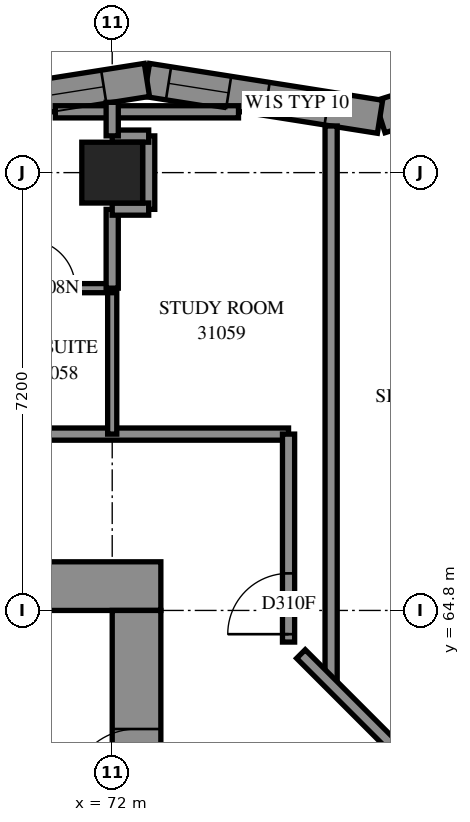
"""IFC4 building model, lengths in metres.
Left out: names, types, materials, properties, quantities, classifications, styles, units other than length and angle.
Written with IfcOpenShell. Run it as: python <this file> out.ifc"""

import sys

from ifc_helpers import new_model, si_unit, direction, frame, frame_2d, origin, origin_2d, place, context, subcontext, project, spatial, polyline, rectangle, outline, extrude, element, fill, save


model = new_model("IFC4")
c1 = context("Model", 3, precision=1e-05, world=origin(), true_north=direction((0.0, 1.0)))
c2 = subcontext(c1, "Body", "Model", "MODEL_VIEW")
j1 = project(units=[si_unit("LENGTHUNIT", "METRE"), si_unit("PLANEANGLEUNIT", "RADIAN")], contexts=[c1])
p1 = place(None, origin())
s1 = spatial("IfcSite", under=j1, at=p1, CompositionType="ELEMENT")
p2 = place(p1, origin())
s2 = spatial("IfcBuilding", under=s1, at=p2, CompositionType="ELEMENT")
p3 = place(p2, frame((0.0, 0.0, 115.2)))
s3 = spatial("IfcBuildingStorey", under=s2, at=p3, CompositionType="ELEMENT", Elevation=115.2)
p4 = place(p3, frame((72.0, 72.0, 0.0), z_axis=(0.0, 0.0, 1.0), x_axis=(1.0, 0.0, 0.0)))
e1 = element("IfcColumn", 1, at=p4, inside=s3, PredefinedType="COLUMN", context=c2, shape_type="SweptSolid", body=[
    extrude(rectangle(XDim=1.0, YDim=1.0, at=origin_2d()), origin(), (0.0, 0.0, 1.0), 3.1),
])
p5 = place(p3, frame((56.8, 65.2, -0.3), z_axis=(0.0, 0.0, 1.0), x_axis=(1.0, 0.0, 0.0)))
e2 = element("IfcWall", 2, at=p5, inside=s3, PredefinedType="SHEAR", context=c2, shape_type="SweptSolid", body=[
    extrude(rectangle(XDim=16.0, YDim=0.8, at=frame_2d((8.0, 0.0))), origin(), (0.0, 0.0, 1.0), 2.7),
])
p6 = place(p5, frame((10.8, 0.0, 0.3)))
e3 = element("IfcOpeningElement", 3, at=p6, cuts=e2, PredefinedType="OPENING", context=c2, shape_type="SweptSolid", body=[
    extrude(rectangle(XDim=0.8, YDim=2.1, at=frame_2d((0.4, 1.05))), frame((0.0, 0.41, 0.0), z_axis=(0.0, -1.0, 0.0), x_axis=(1.0, 0.0, 0.0)), (0.0, 0.0, 1.0), 0.82),
])
p7 = place(p3, frame((72.4, 50.4, -0.3), z_axis=(0.0, 0.0, 1.0), x_axis=(0.0, 1.0, 0.0)))
e4 = element("IfcWall", 4, at=p7, inside=s3, PredefinedType="SHEAR", context=c2, shape_type="SweptSolid", body=[
    extrude(rectangle(XDim=14.4, YDim=0.8, at=frame_2d((7.2, 0.0))), origin(), (0.0, 0.0, 1.0), 2.7),
])
p8 = place(p7, frame((4.55, 0.0, 0.3)))
e5 = element("IfcOpeningElement", 5, at=p8, cuts=e4, PredefinedType="OPENING", context=c2, shape_type="SweptSolid", body=[
    extrude(rectangle(XDim=1.1, YDim=2.1, at=frame_2d((0.55, 1.05))), frame((0.0, 0.41, 0.0), z_axis=(0.0, -1.0, 0.0), x_axis=(1.0, 0.0, 0.0)), (0.0, 0.0, 1.0), 0.82),
])
p9 = place(p7, frame((11.35, 0.0, 0.3)))
e6 = element("IfcOpeningElement", 6, at=p9, cuts=e4, PredefinedType="OPENING", context=c2, shape_type="SweptSolid", body=[
    extrude(rectangle(XDim=1.1, YDim=2.1, at=frame_2d((0.55, 1.05))), frame((0.0, 0.41, 0.0), z_axis=(0.0, -1.0, 0.0), x_axis=(1.0, 0.0, 0.0)), (0.0, 0.0, 1.0), 0.82),
])
p10 = place(p3, frame((80.05, 74.069, 0.0), z_axis=(0.0, 0.0, 1.0), x_axis=(-0.9536522041, -0.3009110726, 0.0)))
e7 = element("IfcWall", 7, at=p10, inside=s3, PredefinedType="SOLIDWALL", context=c2, shape_type="SweptSolid", body=[
    extrude(outline(polyline([(-0.239, -0.275), (3.759, -0.275), (3.889, 0.275), (0.239, 0.275), (-0.239, -0.275)])), origin(), (0.0, 0.0, 1.0), 3.1),
])
p11 = place(p10, frame((1.308, 0.0, 0.5)))
e8 = element("IfcOpeningElement", 8, at=p11, cuts=e7, PredefinedType="OPENING", context=c2, shape_type="SweptSolid", body=[
    extrude(rectangle(XDim=1.2, YDim=2.45, at=frame_2d((0.6, 1.225))), frame((0.0, 0.285, 0.0), z_axis=(0.0, -1.0, 0.0), x_axis=(1.0, 0.0, 0.0)), (0.0, 0.0, 1.0), 0.57),
])
p12 = place(p3, frame((76.404, 72.918, 0.0), z_axis=(0.0, 0.0, 1.0), x_axis=(-0.9877221932, 0.1562205785, 0.0)))
e9 = element("IfcWall", 9, at=p12, inside=s3, PredefinedType="SOLIDWALL", context=c2, shape_type="SweptSolid", body=[
    extrude(outline(polyline([(0.065, -0.275), (3.925, -0.275), (3.838, 0.275), (-0.065, 0.275), (0.065, -0.275)])), origin(), (0.0, 0.0, 1.0), 3.1),
])
p13 = place(p12, frame((0.88, 0.0, 0.45)))
e10 = element("IfcOpeningElement", 10, at=p13, cuts=e9, PredefinedType="OPENING", context=c2, shape_type="SweptSolid", body=[
    extrude(rectangle(XDim=1.0, YDim=2.5, at=frame_2d((0.5, 1.25))), frame((0.0, 0.285, 0.0), z_axis=(0.0, -1.0, 0.0), x_axis=(1.0, 0.0, 0.0)), (0.0, 0.0, 1.0), 0.57),
])
p14 = place(p12, frame((2.521, 0.0, 0.45)))
e11 = element("IfcOpeningElement", 11, at=p14, cuts=e9, PredefinedType="OPENING", context=c2, shape_type="SweptSolid", body=[
    extrude(rectangle(XDim=1.0, YDim=2.5, at=frame_2d((0.5, 1.25))), frame((0.0, 0.285, 0.0), z_axis=(0.0, -1.0, 0.0), x_axis=(1.0, 0.0, 0.0)), (0.0, 0.0, 1.0), 0.57),
])
p15 = place(p3, frame((72.571, 73.525, 0.0), z_axis=(0.0, 0.0, 1.0), x_axis=(-0.9877213372, -0.1562259905, 0.0)))
e12 = element("IfcWall", 12, at=p15, inside=s3, PredefinedType="SOLIDWALL", context=c2, shape_type="SweptSolid", body=[
    extrude(outline(polyline([(-0.043, -0.275), (3.816, -0.275), (3.903, 0.275), (0.043, 0.275), (-0.043, -0.275)])), origin(), (0.0, 0.0, 1.0), 3.1),
])
p16 = place(p15, frame((0.719, 0.0, 0.5)))
e13 = element("IfcOpeningElement", 13, at=p16, cuts=e12, PredefinedType="OPENING", context=c2, shape_type="SweptSolid", body=[
    extrude(rectangle(XDim=1.3, YDim=2.45, at=frame_2d((0.65, 1.225))), frame((0.0, 0.285, 0.0), z_axis=(0.0, -1.0, 0.0), x_axis=(1.0, 0.0, 0.0)), (0.0, 0.0, 1.0), 0.57),
])
p17 = place(p15, frame((2.219, 0.0, 0.5)))
e14 = element("IfcOpeningElement", 14, at=p17, cuts=e12, PredefinedType="OPENING", context=c2, shape_type="SweptSolid", body=[
    extrude(rectangle(XDim=1.3, YDim=2.45, at=frame_2d((0.65, 1.225))), frame((0.0, 0.285, 0.0), z_axis=(0.0, -1.0, 0.0), x_axis=(1.0, 0.0, 0.0)), (0.0, 0.0, 1.0), 0.57),
])
p18 = place(p3, frame((54.7, 67.7, 0.0), z_axis=(0.0, 0.0, 1.0), x_axis=(1.0, 0.0, 0.0)))
e15 = element("IfcWall", 15, at=p18, inside=s3, PredefinedType="PARTITIONING", context=c2, shape_type="SweptSolid", body=[
    extrude(rectangle(XDim=20.2, YDim=0.2, at=frame_2d((10.1, 0.0))), origin(), (0.0, 0.0, 1.0), 3.1),
])
p19 = place(p18, frame((5.2, 0.0, 0.0)))
e16 = element("IfcOpeningElement", 16, at=p19, cuts=e15, PredefinedType="OPENING", context=c2, shape_type="SweptSolid", body=[
    extrude(rectangle(XDim=0.9, YDim=2.1, at=frame_2d((0.45, 1.05))), frame((0.0, 0.11, 0.0), z_axis=(0.0, -1.0, 0.0), x_axis=(1.0, 0.0, 0.0)), (0.0, 0.0, 1.0), 0.22),
])
p20 = place(p18, frame((8.838, 0.0, 0.0)))
e17 = element("IfcOpeningElement", 17, at=p20, cuts=e15, PredefinedType="OPENING", context=c2, shape_type="SweptSolid", body=[
    extrude(rectangle(XDim=1.0, YDim=2.1, at=frame_2d((0.5, 1.05))), frame((0.0, 0.11, 0.0), z_axis=(0.0, -1.0, 0.0), x_axis=(1.0, 0.0, 0.0)), (0.0, 0.0, 1.0), 0.22),
])
p21 = place(p18, frame((14.1, 0.0, 0.0)))
e18 = element("IfcOpeningElement", 18, at=p21, cuts=e15, PredefinedType="OPENING", context=c2, shape_type="SweptSolid", body=[
    extrude(rectangle(XDim=0.9, YDim=2.1, at=frame_2d((0.45, 1.05))), frame((0.0, 0.11, 0.0), z_axis=(0.0, -1.0, 0.0), x_axis=(1.0, 0.0, 0.0)), (0.0, 0.0, 1.0), 0.22),
])
p22 = place(p3, frame((75.6, 63.58, 0.0), z_axis=(0.0, 0.0, 1.0), x_axis=(0.0, 1.0, 0.0)))
e19 = element("IfcWall", 19, at=p22, inside=s3, PredefinedType="PARTITIONING", context=c2, shape_type="SweptSolid", body=[
    extrude(rectangle(XDim=9.187, YDim=0.2, at=frame_2d((4.593, 0.0))), origin(), (0.0, 0.0, 1.0), 3.1),
])
p23 = place(p3, frame((75.103, 64.083, 0.0), z_axis=(0.0, 0.0, 1.0), x_axis=(0.7071067812, -0.7071067812, 0.0)))
e20 = element("IfcWall", 20, at=p23, inside=s3, PredefinedType="PARTITIONING", context=c2, shape_type="SweptSolid", body=[
    extrude(rectangle(XDim=4.214, YDim=0.2, at=frame_2d((2.107, 0.0))), origin(), (0.0, 0.0, 1.0), 3.1),
])
p24 = place(p23, frame((2.979, 0.0, 0.0)))
e21 = element("IfcOpeningElement", 21, at=p24, cuts=e20, PredefinedType="OPENING", context=c2, shape_type="SweptSolid", body=[
    extrude(rectangle(XDim=1.0, YDim=2.1, at=frame_2d((0.5, 1.05))), frame((0.0, 0.11, 0.0), z_axis=(0.0, -1.0, 0.0), x_axis=(1.0, 0.0, 0.0)), (0.0, 0.0, 1.0), 0.22),
])
p25 = place(p3, frame((74.9, 64.28, 0.0), z_axis=(0.0, 0.0, 1.0), x_axis=(0.0, 1.0, 0.0)))
e22 = element("IfcWall", 22, at=p25, inside=s3, PredefinedType="PARTITIONING", context=c2, shape_type="SweptSolid", body=[
    extrude(rectangle(XDim=3.42, YDim=0.2, at=frame_2d((1.71, 0.0))), origin(), (0.0, 0.0, 1.0), 3.1),
])
p26 = place(p25, frame((0.13, 0.0, 0.0)))
e23 = element("IfcOpeningElement", 23, at=p26, cuts=e22, PredefinedType="OPENING", context=c2, shape_type="SweptSolid", body=[
    extrude(rectangle(XDim=1.0, YDim=2.1, at=frame_2d((0.5, 1.05))), frame((0.0, 0.11, 0.0), z_axis=(0.0, -1.0, 0.0), x_axis=(1.0, 0.0, 0.0)), (0.0, 0.0, 1.0), 0.22),
])
p27 = place(p3, frame((71.064, 73.0, 0.0), z_axis=(0.0, 0.0, 1.0), x_axis=(1.0, 0.0, 0.0)))
e24 = element("IfcWall", 24, at=p27, inside=s3, PredefinedType="PARTITIONING", context=c2, shape_type="SweptSolid", body=[
    extrude(rectangle(XDim=3.013, YDim=0.2, at=frame_2d((1.506, 0.0))), origin(), (0.0, 0.0, 1.0), 3.1),
])
p28 = place(p3, frame((72.0, 67.7, 0.0), z_axis=(0.0, 0.0, 1.0), x_axis=(0.0, 1.0, 0.0)))
e25 = element("IfcWall", 25, at=p28, inside=s3, PredefinedType="PARTITIONING", context=c2, shape_type="SweptSolid", body=[
    extrude(rectangle(XDim=2.4, YDim=0.15, at=frame_2d((1.2, 0.0))), origin(), (0.0, 0.0, 1.0), 3.1),
])
p29 = place(p3, frame((70.1, 70.1, 0.0), z_axis=(0.0, 0.0, 1.0), x_axis=(1.0, 0.0, 0.0)))
e26 = element("IfcWall", 26, at=p29, inside=s3, PredefinedType="PARTITIONING", context=c2, shape_type="SweptSolid", body=[
    extrude(rectangle(XDim=1.9, YDim=0.15, at=frame_2d((0.95, 0.0))), origin(), (0.0, 0.0, 1.0), 3.1),
])
p30 = place(p29, frame((0.493, 0.0, 0.0)))
e27 = element("IfcOpeningElement", 27, at=p30, cuts=e26, PredefinedType="OPENING", context=c2, shape_type="SweptSolid", body=[
    extrude(rectangle(XDim=0.8, YDim=2.1, at=frame_2d((0.4, 1.05))), frame((0.0, 0.085, 0.0), z_axis=(0.0, -1.0, 0.0), x_axis=(1.0, 0.0, 0.0)), (0.0, 0.0, 1.0), 0.17),
])
p31 = place(p3, frame((72.0, 70.1, 0.0), z_axis=(0.0, 0.0, 1.0), x_axis=(0.0, 1.0, 0.0)))
e28 = element("IfcWall", 28, at=p31, inside=s3, PredefinedType="PARTITIONING", context=c2, shape_type="SweptSolid", body=[
    extrude(rectangle(XDim=1.296, YDim=0.2, at=frame_2d((0.648, 0.0))), origin(), (0.0, 0.0, 1.0), 3.1),
])
p32 = place(p3, frame((72.6, 71.396, 0.0), z_axis=(0.0, 0.0, 1.0), x_axis=(0.0, 1.0, 0.0)))
e29 = element("IfcWall", 29, at=p32, inside=s3, PredefinedType="PARTITIONING", context=c2, shape_type="SweptSolid", body=[
    extrude(rectangle(XDim=1.208, YDim=0.2, at=frame_2d((0.604, 0.0))), origin(), (0.0, 0.0, 1.0), 3.1),
])
for number, where, z_axis, x_axis in (
    (30, (72.0, 72.6, 0.0), (0.0, 0.0, 1.0), (1.0, 0.0, 0.0)),
    (31, (72.0, 71.4, 0.0), (0.0, 0.0, 1.0), (1.0, 0.0, 0.0)),
):
    element("IfcWall", number, at=place(p3, frame(where, z_axis=z_axis, x_axis=x_axis)), inside=s3, PredefinedType="PARTITIONING", context=c2, shape_type="SweptSolid", body=[
        extrude(rectangle(XDim=0.6, YDim=0.2, at=frame_2d((0.3, 0.0))), origin(), (0.0, 0.0, 1.0), 3.1),
    ])
p33 = place(p3, frame((72.0, 72.604, 0.0), z_axis=(0.0, 0.0, 1.0), x_axis=(0.0, 1.0, 0.0)))
e32 = element("IfcWall", 32, at=p33, inside=s3, PredefinedType="PARTITIONING", context=c2, shape_type="SweptSolid", body=[
    extrude(rectangle(XDim=0.552, YDim=0.2, at=frame_2d((0.276, 0.0))), origin(), (0.0, 0.0, 1.0), 3.1),
])
p34 = place(p16, origin())
e33 = element("IfcWindow", 33, at=p34, inside=s3, PartitioningType="SINGLE_PANEL", PredefinedType="WINDOW", context=c2, shape_type="SweptSolid", body=[
    extrude(rectangle(XDim=1.3, YDim=2.45, at=frame_2d((0.65, 1.225))), frame((0.0, 0.145, 0.0), z_axis=(0.0, -1.0, 0.0), x_axis=(1.0, 0.0, 0.0)), (0.0, 0.0, 1.0), 0.06),
])
fill(e13, e33)
p35 = place(p9, origin())
e34 = element("IfcDoor", 34, at=p35, inside=s3, OperationType="SINGLE_SWING_RIGHT", PredefinedType="DOOR", context=c2, shape_type="SweptSolid", body=[
    extrude(rectangle(XDim=1.1, YDim=2.1, at=frame_2d((0.55, 1.05))), frame((0.0, 0.025, 0.0), z_axis=(0.0, -1.0, 0.0), x_axis=(1.0, 0.0, 0.0)), (0.0, 0.0, 1.0), 0.05),
])
fill(e6, e34)
p36 = place(p30, origin())
e35 = element("IfcDoor", 35, at=p36, inside=s3, OperationType="SINGLE_SWING_RIGHT", PredefinedType="DOOR", context=c2, shape_type="SweptSolid", body=[
    extrude(rectangle(XDim=0.8, YDim=2.1, at=frame_2d((0.4, 1.05))), frame((0.0, 0.025, 0.0), z_axis=(0.0, -1.0, 0.0), x_axis=(1.0, 0.0, 0.0)), (0.0, 0.0, 1.0), 0.05),
])
fill(e27, e35)
p37 = place(p26, origin())
e36 = element("IfcDoor", 36, at=p37, inside=s3, OperationType="SINGLE_SWING_RIGHT", PredefinedType="DOOR", context=c2, shape_type="SweptSolid", body=[
    extrude(rectangle(XDim=1.0, YDim=2.1, at=frame_2d((0.5, 1.05))), frame((0.0, 0.025, 0.0), z_axis=(0.0, -1.0, 0.0), x_axis=(1.0, 0.0, 0.0)), (0.0, 0.0, 1.0), 0.05),
])
fill(e23, e36)
p38 = place(p13, origin())
e37 = element("IfcWindow", 37, at=p38, inside=s3, PartitioningType="SINGLE_PANEL", PredefinedType="WINDOW", context=c2, shape_type="SweptSolid", body=[
    extrude(rectangle(XDim=1.0, YDim=2.5, at=frame_2d((0.5, 1.25))), frame((0.0, 0.155, 0.0), z_axis=(0.0, -1.0, 0.0), x_axis=(1.0, 0.0, 0.0)), (0.0, 0.0, 1.0), 0.06),
])
fill(e10, e37)
p39 = place(p14, origin())
e38 = element("IfcWindow", 38, at=p39, inside=s3, PartitioningType="SINGLE_PANEL", PredefinedType="WINDOW", context=c2, shape_type="SweptSolid", body=[
    extrude(rectangle(XDim=1.0, YDim=2.5, at=frame_2d((0.5, 1.25))), frame((0.0, 0.155, 0.0), z_axis=(0.0, -1.0, 0.0), x_axis=(1.0, 0.0, 0.0)), (0.0, 0.0, 1.0), 0.06),
])
fill(e11, e38)
save(model, sys.argv[1])
